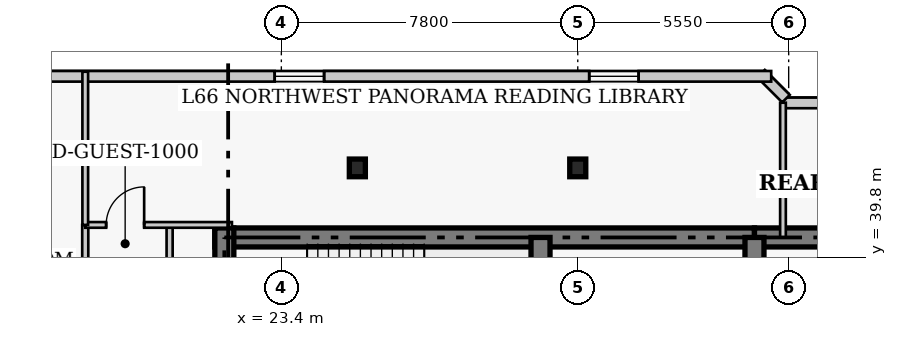
"""IFC4 building model, lengths in metres.
Left out: names, types, materials, properties, quantities, classifications, styles, units other than length and angle.
Written with IfcOpenShell. Run it as: python <this file> out.ifc"""

import sys

from ifc_helpers import new_model, si_unit, direction, frame, frame_2d, origin, origin_2d, place, context, subcontext, project, spatial, rectangle, i_section, extrude, element, fill, save


model = new_model("IFC4")
c1 = context("Model", 3, precision=1e-05, world=origin(), true_north=direction((0.0, 1.0)))
c2 = subcontext(c1, "Body", "Model", "MODEL_VIEW")
j1 = project(units=[si_unit("LENGTHUNIT", "METRE"), si_unit("PLANEANGLEUNIT", "RADIAN")], contexts=[c1])
p1 = place(None, origin())
s1 = spatial("IfcSite", under=j1, at=p1, CompositionType="ELEMENT")
p2 = place(p1, origin())
s2 = spatial("IfcBuilding", under=s1, at=p2, CompositionType="ELEMENT")
p3 = place(p2, frame((0.0, 0.0, 265.4)))
s3 = spatial("IfcBuildingStorey", under=s2, at=p3, CompositionType="ELEMENT", Elevation=265.4)
p4 = place(p3, frame((21.65, 40.32, 0.0), z_axis=(0.0, 0.0, 1.0), x_axis=(1.0, 0.0, 0.0)))
e1 = element("IfcWall", 1, at=p4, inside=s3, PredefinedType="SHEAR", context=c2, shape_type="SweptSolid", body=[
    extrude(rectangle(XDim=14.2, YDim=0.5, at=frame_2d((7.1, 0.0))), origin(), (0.0, 0.0, 1.0), 4.0),
])
p5 = place(p3, frame((35.85, 40.32, 0.0), z_axis=(0.0, 0.0, 1.0), x_axis=(1.0, 0.0, 0.0)))
e2 = element("IfcWall", 2, at=p5, inside=s3, PredefinedType="SHEAR", context=c2, shape_type="SweptSolid", body=[
    extrude(rectangle(XDim=12.6, YDim=0.5, at=frame_2d((6.3, 0.0))), origin(), (0.0, 0.0, 1.0), 4.0),
])
p6 = place(p3, frame((21.9, 27.05, 0.0), z_axis=(0.0, 0.0, 1.0), x_axis=(0.0, 1.0, 0.0)))
e3 = element("IfcWall", 3, at=p6, inside=s3, PredefinedType="SHEAR", context=c2, shape_type="SweptSolid", body=[
    extrude(rectangle(XDim=13.52, YDim=0.5, at=frame_2d((6.76, 0.0))), origin(), (0.0, 0.0, 1.0), 4.0),
])
p7 = place(p3, frame((30.22, 33.0, 0.0), z_axis=(0.0, 0.0, 1.0), x_axis=(0.0, 1.0, 0.0)))
e4 = element("IfcWall", 4, at=p7, inside=s3, PredefinedType="SHEAR", context=c2, shape_type="SweptSolid", body=[
    extrude(rectangle(XDim=7.32, YDim=0.5, at=frame_2d((3.66, 0.0))), origin(), (0.0, 0.0, 1.0), 4.0),
])
p8 = place(p3, frame((35.85, 36.37, 0.0), z_axis=(0.0, 0.0, 1.0), x_axis=(0.0, 1.0, 0.0)))
e5 = element("IfcWall", 5, at=p8, inside=s3, PredefinedType="SHEAR", context=c2, shape_type="SweptSolid", body=[
    extrude(rectangle(XDim=3.95, YDim=0.5, at=frame_2d((1.975, 0.0))), origin(), (0.0, 0.0, 1.0), 4.0),
])
p9 = place(p8, frame((0.88, 0.0, 0.0)))
e6 = element("IfcOpeningElement", 6, at=p9, cuts=e5, PredefinedType="OPENING", context=c2, shape_type="SweptSolid", body=[
    extrude(rectangle(XDim=1.1, YDim=2.15, at=frame_2d((0.55, 1.075))), frame((0.0, 0.26, 0.0), z_axis=(0.0, -1.0, 0.0), x_axis=(1.0, 0.0, 0.0)), (0.0, 0.0, 1.0), 0.52),
])
for number, where, z_axis, x_axis in (
    (7, (25.4, 42.15, 0.0), (0.0, 0.0, 1.0), (1.0, 0.0, 0.0)),
    (8, (31.2, 42.15, 0.0), (0.0, 0.0, 1.0), (1.0, 0.0, 0.0)),
):
    element("IfcColumn", number, at=place(p3, frame(where, z_axis=z_axis, x_axis=x_axis)), inside=s3, PredefinedType="COLUMN", context=c2, shape_type="SweptSolid", body=[
        extrude(i_section(OverallWidth=0.422, OverallDepth=0.465, WebThickness=0.045, FlangeThickness=0.073, FilletRadius=0.017, at=origin_2d()), origin(), (0.0, 0.0, 1.0), 4.0),
    ])
p10 = place(p3, frame((41.39, 43.86, 0.0), z_axis=(0.0, 0.0, 1.0), x_axis=(-1.0, 0.0, 0.0)))
e9 = element("IfcWall", 9, at=p10, inside=s3, PredefinedType="SOLIDWALL", context=c2, shape_type="SweptSolid", body=[
    extrude(rectangle(XDim=4.78, YDim=0.28, at=frame_2d((2.39, 0.0))), origin(), (0.0, 0.0, 1.0), 3.76),
])
p11 = place(p10, frame((1.74, 0.0, 0.85)))
e10 = element("IfcOpeningElement", 10, at=p11, cuts=e9, PredefinedType="OPENING", context=c2, shape_type="SweptSolid", body=[
    extrude(rectangle(XDim=1.3, YDim=1.7, at=frame_2d((0.65, 0.85))), frame((0.0, 0.15, 0.0), z_axis=(0.0, -1.0, 0.0), x_axis=(1.0, 0.0, 0.0)), (0.0, 0.0, 1.0), 0.3),
])
p12 = place(p3, frame((36.679, 43.973, 0.0), z_axis=(0.0, 0.0, 1.0), x_axis=(-0.706975312048, 0.707238225886, 0.0)))
e11 = element("IfcWall", 11, at=p12, inside=s3, PredefinedType="SOLIDWALL", context=c2, shape_type="SweptSolid", body=[
    extrude(rectangle(XDim=0.929, YDim=0.28, at=frame_2d((0.464, 0.0))), origin(), (0.0, 0.0, 1.0), 3.76),
])
p13 = place(p3, frame((36.29, 44.56, 0.0), z_axis=(0.0, 0.0, 1.0), x_axis=(-1.0, 0.0, 0.0)))
e12 = element("IfcWall", 12, at=p13, inside=s3, PredefinedType="SOLIDWALL", context=c2, shape_type="SweptSolid", body=[
    extrude(rectangle(XDim=24.83, YDim=0.28, at=frame_2d((12.415, 0.0))), origin(), (0.0, 0.0, 1.0), 3.76),
])
p14 = place(p13, frame((3.488, 0.0, 0.85)))
e13 = element("IfcOpeningElement", 13, at=p14, cuts=e12, PredefinedType="OPENING", context=c2, shape_type="SweptSolid", body=[
    extrude(rectangle(XDim=1.3, YDim=1.7, at=frame_2d((0.65, 0.85))), frame((0.0, 0.15, 0.0), z_axis=(0.0, -1.0, 0.0), x_axis=(1.0, 0.0, 0.0)), (0.0, 0.0, 1.0), 0.3),
])
p15 = place(p13, frame((11.765, 0.0, 0.85)))
e14 = element("IfcOpeningElement", 14, at=p15, cuts=e12, PredefinedType="OPENING", context=c2, shape_type="SweptSolid", body=[
    extrude(rectangle(XDim=1.3, YDim=1.7, at=frame_2d((0.65, 0.85))), frame((0.0, 0.15, 0.0), z_axis=(0.0, -1.0, 0.0), x_axis=(1.0, 0.0, 0.0)), (0.0, 0.0, 1.0), 0.3),
])
p16 = place(p13, frame((20.042, 0.0, 0.85)))
e15 = element("IfcOpeningElement", 15, at=p16, cuts=e12, PredefinedType="OPENING", context=c2, shape_type="SweptSolid", body=[
    extrude(rectangle(XDim=1.3, YDim=1.7, at=frame_2d((0.65, 0.85))), frame((0.0, 0.15, 0.0), z_axis=(0.0, -1.0, 0.0), x_axis=(1.0, 0.0, 0.0)), (0.0, 0.0, 1.0), 0.3),
])
p17 = place(p3, frame((18.24, 8.55, 0.0), z_axis=(0.0, 0.0, 1.0), x_axis=(0.0, 1.0, 0.0)))
e16 = element("IfcWall", 16, at=p17, inside=s3, PredefinedType="PARTITIONING", context=c2, shape_type="SweptSolid", body=[
    extrude(rectangle(XDim=32.1, YDim=0.16, at=frame_2d((16.05, 0.0))), origin(), (0.0, 0.0, 1.0), 3.76),
])
p18 = place(p17, frame((5.25, 0.0, 0.0)))
e17 = element("IfcOpeningElement", 17, at=p18, cuts=e16, PredefinedType="OPENING", context=c2, shape_type="SweptSolid", body=[
    extrude(rectangle(XDim=0.95, YDim=2.1, at=frame_2d((0.475, 1.05))), frame((0.0, 0.09, 0.0), z_axis=(0.0, -1.0, 0.0), x_axis=(1.0, 0.0, 0.0)), (0.0, 0.0, 1.0), 0.18),
])
p19 = place(p17, frame((15.375, 0.0, 0.0)))
e18 = element("IfcOpeningElement", 18, at=p19, cuts=e16, PredefinedType="OPENING", context=c2, shape_type="SweptSolid", body=[
    extrude(rectangle(XDim=0.95, YDim=2.1, at=frame_2d((0.475, 1.05))), frame((0.0, 0.09, 0.0), z_axis=(0.0, -1.0, 0.0), x_axis=(1.0, 0.0, 0.0)), (0.0, 0.0, 1.0), 0.18),
])
p20 = place(p17, frame((23.075, 0.0, 0.0)))
e19 = element("IfcOpeningElement", 19, at=p20, cuts=e16, PredefinedType="OPENING", context=c2, shape_type="SweptSolid", body=[
    extrude(rectangle(XDim=0.95, YDim=2.1, at=frame_2d((0.475, 1.05))), frame((0.0, 0.09, 0.0), z_axis=(0.0, -1.0, 0.0), x_axis=(1.0, 0.0, 0.0)), (0.0, 0.0, 1.0), 0.18),
])
p21 = place(p17, frame((29.03, 0.0, 0.0)))
e20 = element("IfcOpeningElement", 20, at=p21, cuts=e16, PredefinedType="OPENING", context=c2, shape_type="SweptSolid", body=[
    extrude(rectangle(XDim=1.0, YDim=2.15, at=frame_2d((0.5, 1.075))), frame((0.0, 0.09, 0.0), z_axis=(0.0, -1.0, 0.0), x_axis=(1.0, 0.0, 0.0)), (0.0, 0.0, 1.0), 0.18),
])
p22 = place(p3, frame((20.46, 35.02, 0.0), z_axis=(0.0, 0.0, 1.0), x_axis=(0.0, 1.0, 0.0)))
e21 = element("IfcWall", 21, at=p22, inside=s3, PredefinedType="PARTITIONING", context=c2, shape_type="SweptSolid", body=[
    extrude(rectangle(XDim=5.63, YDim=0.16, at=frame_2d((2.815, 0.0))), origin(), (0.0, 0.0, 1.0), 3.76),
])
p23 = place(p3, frame((18.24, 40.65, 0.0), z_axis=(0.0, 0.0, 1.0), x_axis=(1.0, 0.0, 0.0)))
e22 = element("IfcWall", 22, at=p23, inside=s3, PredefinedType="PARTITIONING", context=c2, shape_type="SweptSolid", body=[
    extrude(rectangle(XDim=3.86, YDim=0.15, at=frame_2d((1.93, 0.0))), origin(), (0.0, 0.0, 1.0), 3.76),
])
p24 = place(p23, frame((0.55, 0.0, 0.0)))
e23 = element("IfcOpeningElement", 23, at=p24, cuts=e22, PredefinedType="OPENING", context=c2, shape_type="SweptSolid", body=[
    extrude(rectangle(XDim=1.0, YDim=2.15, at=frame_2d((0.5, 1.075))), frame((0.0, 0.085, 0.0), z_axis=(0.0, -1.0, 0.0), x_axis=(1.0, 0.0, 0.0)), (0.0, 0.0, 1.0), 0.17),
])
p25 = place(p3, frame((18.24, 40.65, 0.0), z_axis=(0.0, 0.0, 1.0), x_axis=(0.0, 1.0, 0.0)))
e24 = element("IfcWall", 24, at=p25, inside=s3, PredefinedType="PARTITIONING", context=c2, shape_type="SweptSolid", body=[
    extrude(rectangle(XDim=4.03, YDim=0.15, at=frame_2d((2.015, 0.0))), origin(), (0.0, 0.0, 1.0), 3.76),
])
p26 = place(p3, frame((36.6, 40.32, 0.0), z_axis=(0.0, 0.0, 1.0), x_axis=(0.0, 1.0, 0.0)))
e25 = element("IfcWall", 25, at=p26, inside=s3, PredefinedType="PARTITIONING", context=c2, shape_type="SweptSolid", body=[
    extrude(rectangle(XDim=3.545, YDim=0.15, at=frame_2d((1.772, 0.0))), origin(), (0.0, 0.0, 1.0), 3.76),
])
p27 = place(p14, origin())
e26 = element("IfcWindow", 26, at=p27, inside=s3, PartitioningType="SINGLE_PANEL", PredefinedType="WINDOW", context=c2, shape_type="SweptSolid", body=[
    extrude(rectangle(XDim=1.3, YDim=1.7, at=frame_2d((0.65, 0.85))), frame((0.0, 0.03, 0.0), z_axis=(0.0, -1.0, 0.0), x_axis=(1.0, 0.0, 0.0)), (0.0, 0.0, 1.0), 0.06),
])
fill(e13, e26)
p28 = place(p15, origin())
e27 = element("IfcWindow", 27, at=p28, inside=s3, PartitioningType="SINGLE_PANEL", PredefinedType="WINDOW", context=c2, shape_type="SweptSolid", body=[
    extrude(rectangle(XDim=1.3, YDim=1.7, at=frame_2d((0.65, 0.85))), frame((0.0, 0.03, 0.0), z_axis=(0.0, -1.0, 0.0), x_axis=(1.0, 0.0, 0.0)), (0.0, 0.0, 1.0), 0.06),
])
fill(e14, e27)
p29 = place(p24, origin())
e28 = element("IfcDoor", 28, at=p29, inside=s3, OperationType="SINGLE_SWING_RIGHT", PredefinedType="DOOR", context=c2, shape_type="SweptSolid", body=[
    extrude(rectangle(XDim=1.0, YDim=2.15, at=frame_2d((0.5, 1.075))), frame((0.0, 0.025, 0.0), z_axis=(0.0, -1.0, 0.0), x_axis=(1.0, 0.0, 0.0)), (0.0, 0.0, 1.0), 0.05),
])
fill(e23, e28)
save(model, sys.argv[1])
